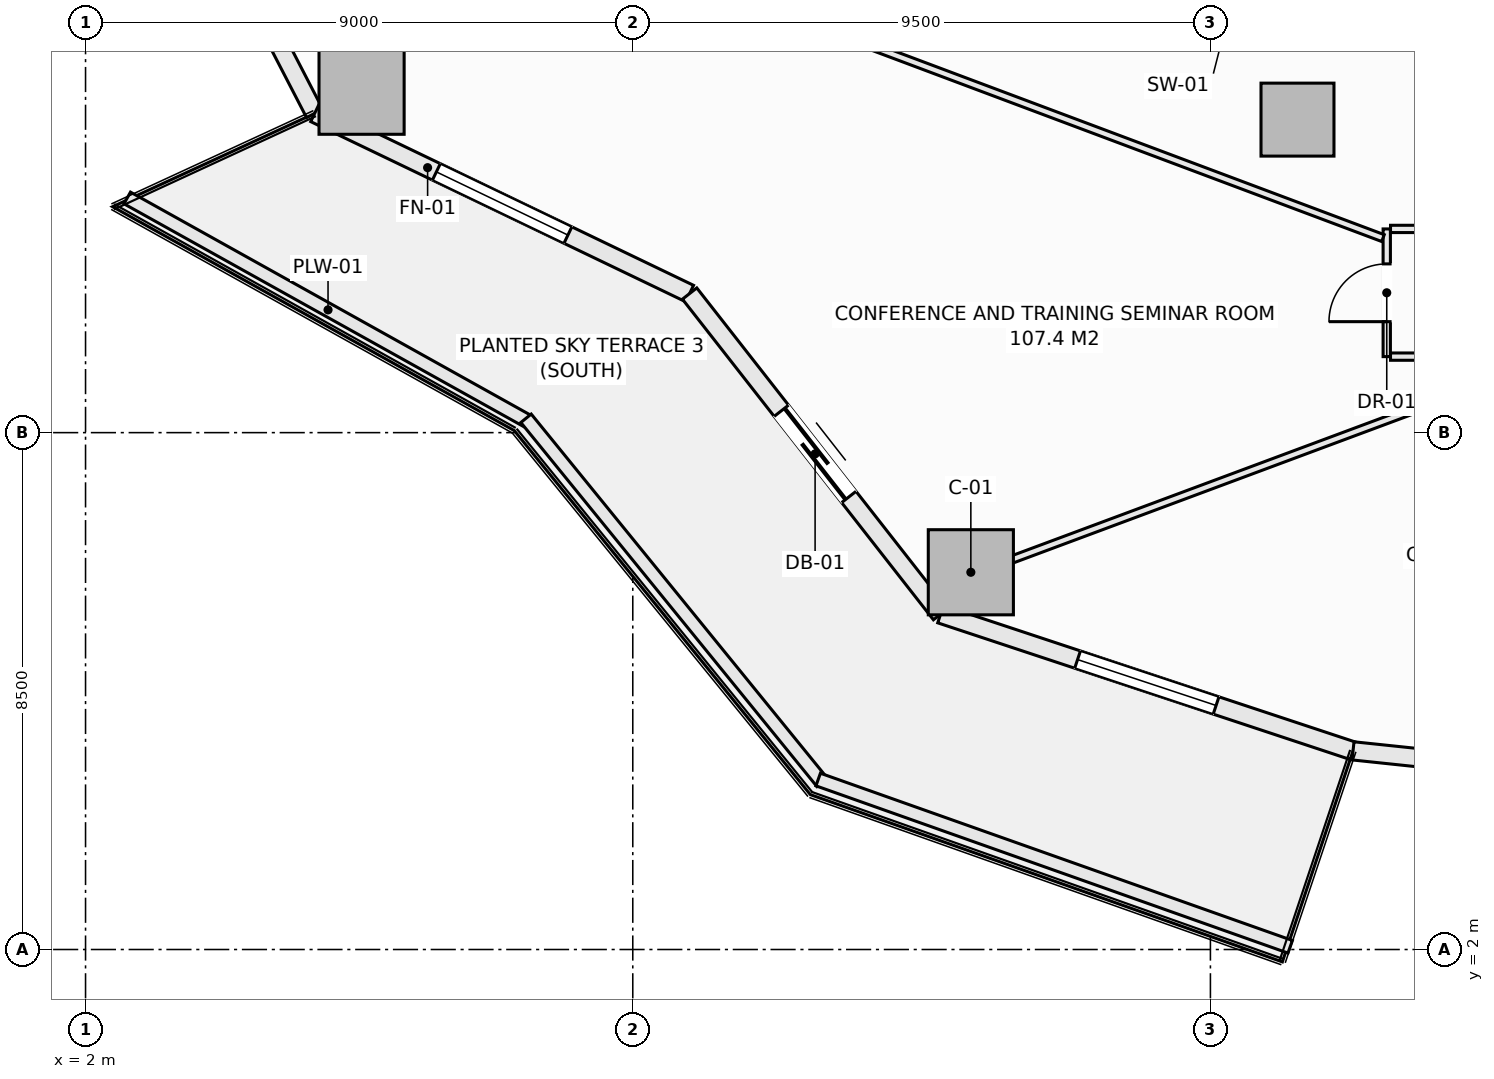
"""IFC4 building model, lengths in metres.
Left out: names, types, materials, properties, quantities, classifications, styles, units other than length and angle.
Written with IfcOpenShell. Run it as: python <this file> out.ifc"""

import sys

from ifc_helpers import new_model, si_unit, direction, frame, frame_2d, origin, origin_2d, place, context, subcontext, project, spatial, rectangle, extrude, element, fill, save


model = new_model("IFC4")
c1 = context("Model", 3, precision=1e-05, world=origin(), true_north=direction((0.0, 1.0)))
c2 = subcontext(c1, "Body", "Model", "MODEL_VIEW")
j1 = project(units=[si_unit("LENGTHUNIT", "METRE"), si_unit("PLANEANGLEUNIT", "RADIAN")], contexts=[c1])
p1 = place(None, origin())
s1 = spatial("IfcSite", under=j1, at=p1, CompositionType="ELEMENT")
p2 = place(p1, origin())
s2 = spatial("IfcBuilding", under=s1, at=p2, CompositionType="ELEMENT")
p3 = place(p2, frame((0.0, 0.0, 34.2)))
s3 = spatial("IfcBuildingStorey", under=s2, at=p3, CompositionType="ELEMENT", Elevation=34.2)
for number, where, z_axis, x_axis in (
    (1, (6.54, 16.106, -0.28), (0.0, 0.0, 1.0), (1.0, 0.0, 0.0)),
    (2, (16.56, 8.204, -0.28), (0.0, 0.0, 1.0), (1.0, 0.0, 0.0)),
):
    element("IfcColumn", number, at=place(p3, frame(where, z_axis=z_axis, x_axis=x_axis)), inside=s3, PredefinedType="COLUMN", context=c2, shape_type="SweptSolid", body=[
        extrude(rectangle(XDim=1.4, YDim=1.4, at=origin_2d()), origin(), (0.0, 0.0, 1.0), 3.85),
    ])
p4 = place(p3, frame((21.932, 15.648, -0.28), z_axis=(0.0, 0.0, 1.0), x_axis=(1.0, 0.0, 0.0)))
e3 = element("IfcColumn", 3, at=p4, inside=s3, PredefinedType="COLUMN", context=c2, shape_type="SweptSolid", body=[
    extrude(rectangle(XDim=1.2, YDim=1.2, at=origin_2d()), origin(), (0.0, 0.0, 1.0), 3.85),
])
p5 = place(p3, frame((2.958, 21.177, 0.0), z_axis=(0.0, 0.0, 1.0), x_axis=(0.459809804413, -0.88801742312, 0.0)))
e4 = element("IfcWall", 4, at=p5, inside=s3, PredefinedType="SOLIDWALL", context=c2, shape_type="SweptSolid", body=[
    extrude(rectangle(XDim=6.111, YDim=0.3, at=frame_2d((3.055, 0.0))), origin(), (0.0, 0.0, 1.0), 3.093),
])
p6 = place(p5, frame((1.855, 0.0, 0.85)))
e5 = element("IfcOpeningElement", 5, at=p6, cuts=e4, PredefinedType="OPENING", context=c2, shape_type="SweptSolid", body=[
    extrude(rectangle(XDim=2.4, YDim=1.9, at=frame_2d((1.2, 0.95))), frame((0.0, 0.16, 0.0), z_axis=(0.0, -1.0, 0.0), x_axis=(1.0, 0.0, 0.0)), (0.0, 0.0, 1.0), 0.32),
])
p7 = place(p3, frame((5.768, 15.75, 0.0), z_axis=(0.0, 0.0, 1.0), x_axis=(0.901360393999, -0.433069786673, 0.0)))
e6 = element("IfcWall", 6, at=p7, inside=s3, PredefinedType="SOLIDWALL", context=c2, shape_type="SweptSolid", body=[
    extrude(rectangle(XDim=6.842, YDim=0.3, at=frame_2d((3.421, 0.0))), origin(), (0.0, 0.0, 1.0), 3.093),
])
p8 = place(p7, frame((2.221, 0.0, 0.85)))
e7 = element("IfcOpeningElement", 7, at=p8, cuts=e6, PredefinedType="OPENING", context=c2, shape_type="SweptSolid", body=[
    extrude(rectangle(XDim=2.4, YDim=1.9, at=frame_2d((1.2, 0.95))), frame((0.0, 0.16, 0.0), z_axis=(0.0, -1.0, 0.0), x_axis=(1.0, 0.0, 0.0)), (0.0, 0.0, 1.0), 0.32),
])
p9 = place(p3, frame((11.935, 12.787, 0.0), z_axis=(0.0, 0.0, 1.0), x_axis=(0.616421309777, -0.787416515482, 0.0)))
e8 = element("IfcWall", 8, at=p9, inside=s3, PredefinedType="SOLIDWALL", context=c2, shape_type="SweptSolid", body=[
    extrude(rectangle(XDim=6.696, YDim=0.3, at=frame_2d((3.348, 0.0))), origin(), (0.0, 0.0, 1.0), 3.093),
])
p10 = place(p9, frame((2.448, 0.0, 0.0)))
e9 = element("IfcOpeningElement", 9, at=p10, cuts=e8, PredefinedType="OPENING", context=c2, shape_type="SweptSolid", body=[
    extrude(rectangle(XDim=1.8, YDim=2.25, at=frame_2d((0.9, 1.125))), frame((0.0, 0.16, 0.0), z_axis=(0.0, -1.0, 0.0), x_axis=(1.0, 0.0, 0.0)), (0.0, 0.0, 1.0), 0.32),
])
p11 = place(p3, frame((16.062, 7.514, 0.0), z_axis=(0.0, 0.0, 1.0), x_axis=(0.949238715533, -0.31455661006, 0.0)))
e10 = element("IfcWall", 10, at=p11, inside=s3, PredefinedType="SOLIDWALL", context=c2, shape_type="SweptSolid", body=[
    extrude(rectangle(XDim=7.146, YDim=0.3, at=frame_2d((3.573, 0.0))), origin(), (0.0, 0.0, 1.0), 3.093),
])
p12 = place(p11, frame((2.373, 0.0, 0.85)))
e11 = element("IfcOpeningElement", 11, at=p12, cuts=e10, PredefinedType="OPENING", context=c2, shape_type="SweptSolid", body=[
    extrude(rectangle(XDim=2.4, YDim=1.9, at=frame_2d((1.2, 0.95))), frame((0.0, 0.16, 0.0), z_axis=(0.0, -1.0, 0.0), x_axis=(1.0, 0.0, 0.0)), (0.0, 0.0, 1.0), 0.32),
])
p13 = place(p3, frame((22.846, 5.267, 0.0), z_axis=(0.0, 0.0, 1.0), x_axis=(0.994500334317, -0.104733399844, 0.0)))
e12 = element("IfcWall", 12, at=p13, inside=s3, PredefinedType="SOLIDWALL", context=c2, shape_type="SweptSolid", body=[
    extrude(rectangle(XDim=7.32, YDim=0.3, at=frame_2d((3.66, 0.0))), origin(), (0.0, 0.0, 1.0), 3.093),
])
p14 = place(p13, frame((2.46, 0.0, 0.85)))
e13 = element("IfcOpeningElement", 13, at=p14, cuts=e12, PredefinedType="OPENING", context=c2, shape_type="SweptSolid", body=[
    extrude(rectangle(XDim=2.4, YDim=1.9, at=frame_2d((1.2, 0.95))), frame((0.0, 0.16, 0.0), z_axis=(0.0, -1.0, 0.0), x_axis=(1.0, 0.0, 0.0)), (0.0, 0.0, 1.0), 0.32),
])
p15 = place(p3, frame((2.685, 14.359, 0.0), z_axis=(0.0, 0.0, 1.0), x_axis=(0.873500119739, -0.48682393205, 0.0)))
e14 = element("IfcWall", 14, at=p15, inside=s3, PredefinedType="PARAPET", context=c2, shape_type="SweptSolid", body=[
    extrude(rectangle(XDim=7.562, YDim=0.22, at=frame_2d((3.781, 0.0))), origin(), (0.0, 0.0, 1.0), 0.52),
])
p16 = place(p3, frame((9.244, 10.736, 0.0), z_axis=(0.0, 0.0, 1.0), x_axis=(0.630997450658, -0.775784903993, 0.0)))
e15 = element("IfcWall", 15, at=p16, inside=s3, PredefinedType="PARAPET", context=c2, shape_type="SweptSolid", body=[
    extrude(rectangle(XDim=7.718, YDim=0.22, at=frame_2d((3.859, 0.0))), origin(), (0.0, 0.0, 1.0), 0.52),
])
p17 = place(p3, frame((14.049, 4.795, 0.0), z_axis=(0.0, 0.0, 1.0), x_axis=(0.942581348797, -0.333976647237, 0.0)))
e16 = element("IfcWall", 16, at=p17, inside=s3, PredefinedType="PARAPET", context=c2, shape_type="SweptSolid", body=[
    extrude(rectangle(XDim=8.236, YDim=0.22, at=frame_2d((4.118, 0.0))), origin(), (0.0, 0.0, 1.0), 0.52),
])
p18 = place(p3, frame((23.4, 11.75, 0.0), z_axis=(0.0, 0.0, 1.0), x_axis=(0.0, 1.0, 0.0)))
e17 = element("IfcWall", 17, at=p18, inside=s3, PredefinedType="PARTITIONING", context=c2, shape_type="SweptSolid", body=[
    extrude(rectangle(XDim=2.1, YDim=0.12, at=frame_2d((1.05, 0.0))), origin(), (0.0, 0.0, 1.0), 3.57),
])
p19 = place(p18, frame((0.575, 0.0, 0.0)))
e18 = element("IfcOpeningElement", 18, at=p19, cuts=e17, PredefinedType="OPENING", context=c2, shape_type="SweptSolid", body=[
    extrude(rectangle(XDim=0.95, YDim=2.1, at=frame_2d((0.475, 1.05))), frame((0.0, 0.07, 0.0), z_axis=(0.0, -1.0, 0.0), x_axis=(1.0, 0.0, 0.0)), (0.0, 0.0, 1.0), 0.14),
])
p20 = place(p3, frame((23.462, 11.75, 0.0), z_axis=(0.0, 0.0, 1.0), x_axis=(1.0, 0.0, 0.0)))
e19 = element("IfcWall", 19, at=p20, inside=s3, PredefinedType="PARTITIONING", context=c2, shape_type="SweptSolid", body=[
    extrude(rectangle(XDim=19.495, YDim=0.12, at=frame_2d((9.748, 0.0))), origin(), (0.0, 0.0, 1.0), 3.57),
])
p21 = place(p20, frame((3.434, 0.0, 0.0)))
e20 = element("IfcOpeningElement", 20, at=p21, cuts=e19, PredefinedType="OPENING", context=c2, shape_type="SweptSolid", body=[
    extrude(rectangle(XDim=0.95, YDim=2.1, at=frame_2d((0.475, 1.05))), frame((0.0, 0.07, 0.0), z_axis=(0.0, -1.0, 0.0), x_axis=(1.0, 0.0, 0.0)), (0.0, 0.0, 1.0), 0.14),
])
p22 = place(p20, frame((11.388, 0.0, 0.0)))
e21 = element("IfcOpeningElement", 21, at=p22, cuts=e19, PredefinedType="OPENING", context=c2, shape_type="SweptSolid", body=[
    extrude(rectangle(XDim=0.95, YDim=2.1, at=frame_2d((0.475, 1.05))), frame((0.0, 0.07, 0.0), z_axis=(0.0, -1.0, 0.0), x_axis=(1.0, 0.0, 0.0)), (0.0, 0.0, 1.0), 0.14),
])
p23 = place(p3, frame((23.462, 13.85, 0.0), z_axis=(0.0, 0.0, 1.0), x_axis=(1.0, 0.0, 0.0)))
e22 = element("IfcWall", 22, at=p23, inside=s3, PredefinedType="PARTITIONING", context=c2, shape_type="SweptSolid", body=[
    extrude(rectangle(XDim=3.596, YDim=0.12, at=frame_2d((1.798, 0.0))), origin(), (0.0, 0.0, 1.0), 3.57),
])
p24 = place(p23, frame((1.323, 0.0, 0.0)))
e23 = element("IfcOpeningElement", 23, at=p24, cuts=e22, PredefinedType="OPENING", context=c2, shape_type="SweptSolid", body=[
    extrude(rectangle(XDim=0.95, YDim=2.1, at=frame_2d((0.475, 1.05))), frame((0.0, 0.07, 0.0), z_axis=(0.0, -1.0, 0.0), x_axis=(1.0, 0.0, 0.0)), (0.0, 0.0, 1.0), 0.14),
])
p25 = place(p3, frame((3.094, 21.29, 0.0), z_axis=(0.0, 0.0, 1.0), x_axis=(0.936344026666, -0.35108384145, 0.0)))
e24 = element("IfcWall", 24, at=p25, inside=s3, PredefinedType="PARTITIONING", context=c2, shape_type="SweptSolid", body=[
    extrude(rectangle(XDim=21.62, YDim=0.12, at=frame_2d((10.81, 0.0))), origin(), (0.0, 0.0, 1.0), 3.57),
])
p26 = place(p3, frame((15.932, 7.927, 0.0), z_axis=(0.0, 0.0, 1.0), x_axis=(0.937141242974, 0.348950269689, 0.0)))
e25 = element("IfcWall", 25, at=p26, inside=s3, PredefinedType="PARTITIONING", context=c2, shape_type="SweptSolid", body=[
    extrude(rectangle(XDim=10.777, YDim=0.12, at=frame_2d((5.389, 0.0))), origin(), (0.0, 0.0, 1.0), 2.934),
])
p27 = place(p8, origin())
e26 = element("IfcWindow", 26, at=p27, inside=s3, PartitioningType="SINGLE_PANEL", PredefinedType="WINDOW", context=c2, shape_type="SweptSolid", body=[
    extrude(rectangle(XDim=2.4, YDim=1.9, at=frame_2d((1.2, 0.95))), frame((0.0, 0.03, 0.0), z_axis=(0.0, -1.0, 0.0), x_axis=(1.0, 0.0, 0.0)), (0.0, 0.0, 1.0), 0.06),
])
fill(e7, e26)
p28 = place(p10, frame((1.8, 0.0, 0.0), z_axis=(0.0, 0.0, 1.0), x_axis=(-1.0, 0.0, 0.0)))
e27 = element("IfcDoor", 27, at=p28, inside=s3, OperationType="SLIDING_TO_LEFT", PredefinedType="DOOR", context=c2, shape_type="SweptSolid", body=[
    extrude(rectangle(XDim=1.8, YDim=2.25, at=frame_2d((0.9, 1.125))), frame((0.0, 0.025, 0.0), z_axis=(0.0, -1.0, 0.0), x_axis=(1.0, 0.0, 0.0)), (0.0, 0.0, 1.0), 0.05),
])
fill(e9, e27)
p29 = place(p12, origin())
e28 = element("IfcWindow", 28, at=p29, inside=s3, PartitioningType="SINGLE_PANEL", PredefinedType="WINDOW", context=c2, shape_type="SweptSolid", body=[
    extrude(rectangle(XDim=2.4, YDim=1.9, at=frame_2d((1.2, 0.95))), frame((0.0, 0.03, 0.0), z_axis=(0.0, -1.0, 0.0), x_axis=(1.0, 0.0, 0.0)), (0.0, 0.0, 1.0), 0.06),
])
fill(e11, e28)
p30 = place(p19, origin())
e29 = element("IfcDoor", 29, at=p30, inside=s3, OperationType="SINGLE_SWING_LEFT", PredefinedType="DOOR", context=c2, shape_type="SweptSolid", body=[
    extrude(rectangle(XDim=0.95, YDim=2.1, at=frame_2d((0.475, 1.05))), frame((0.0, 0.025, 0.0), z_axis=(0.0, -1.0, 0.0), x_axis=(1.0, 0.0, 0.0)), (0.0, 0.0, 1.0), 0.05),
])
fill(e18, e29)
save(model, sys.argv[1])
